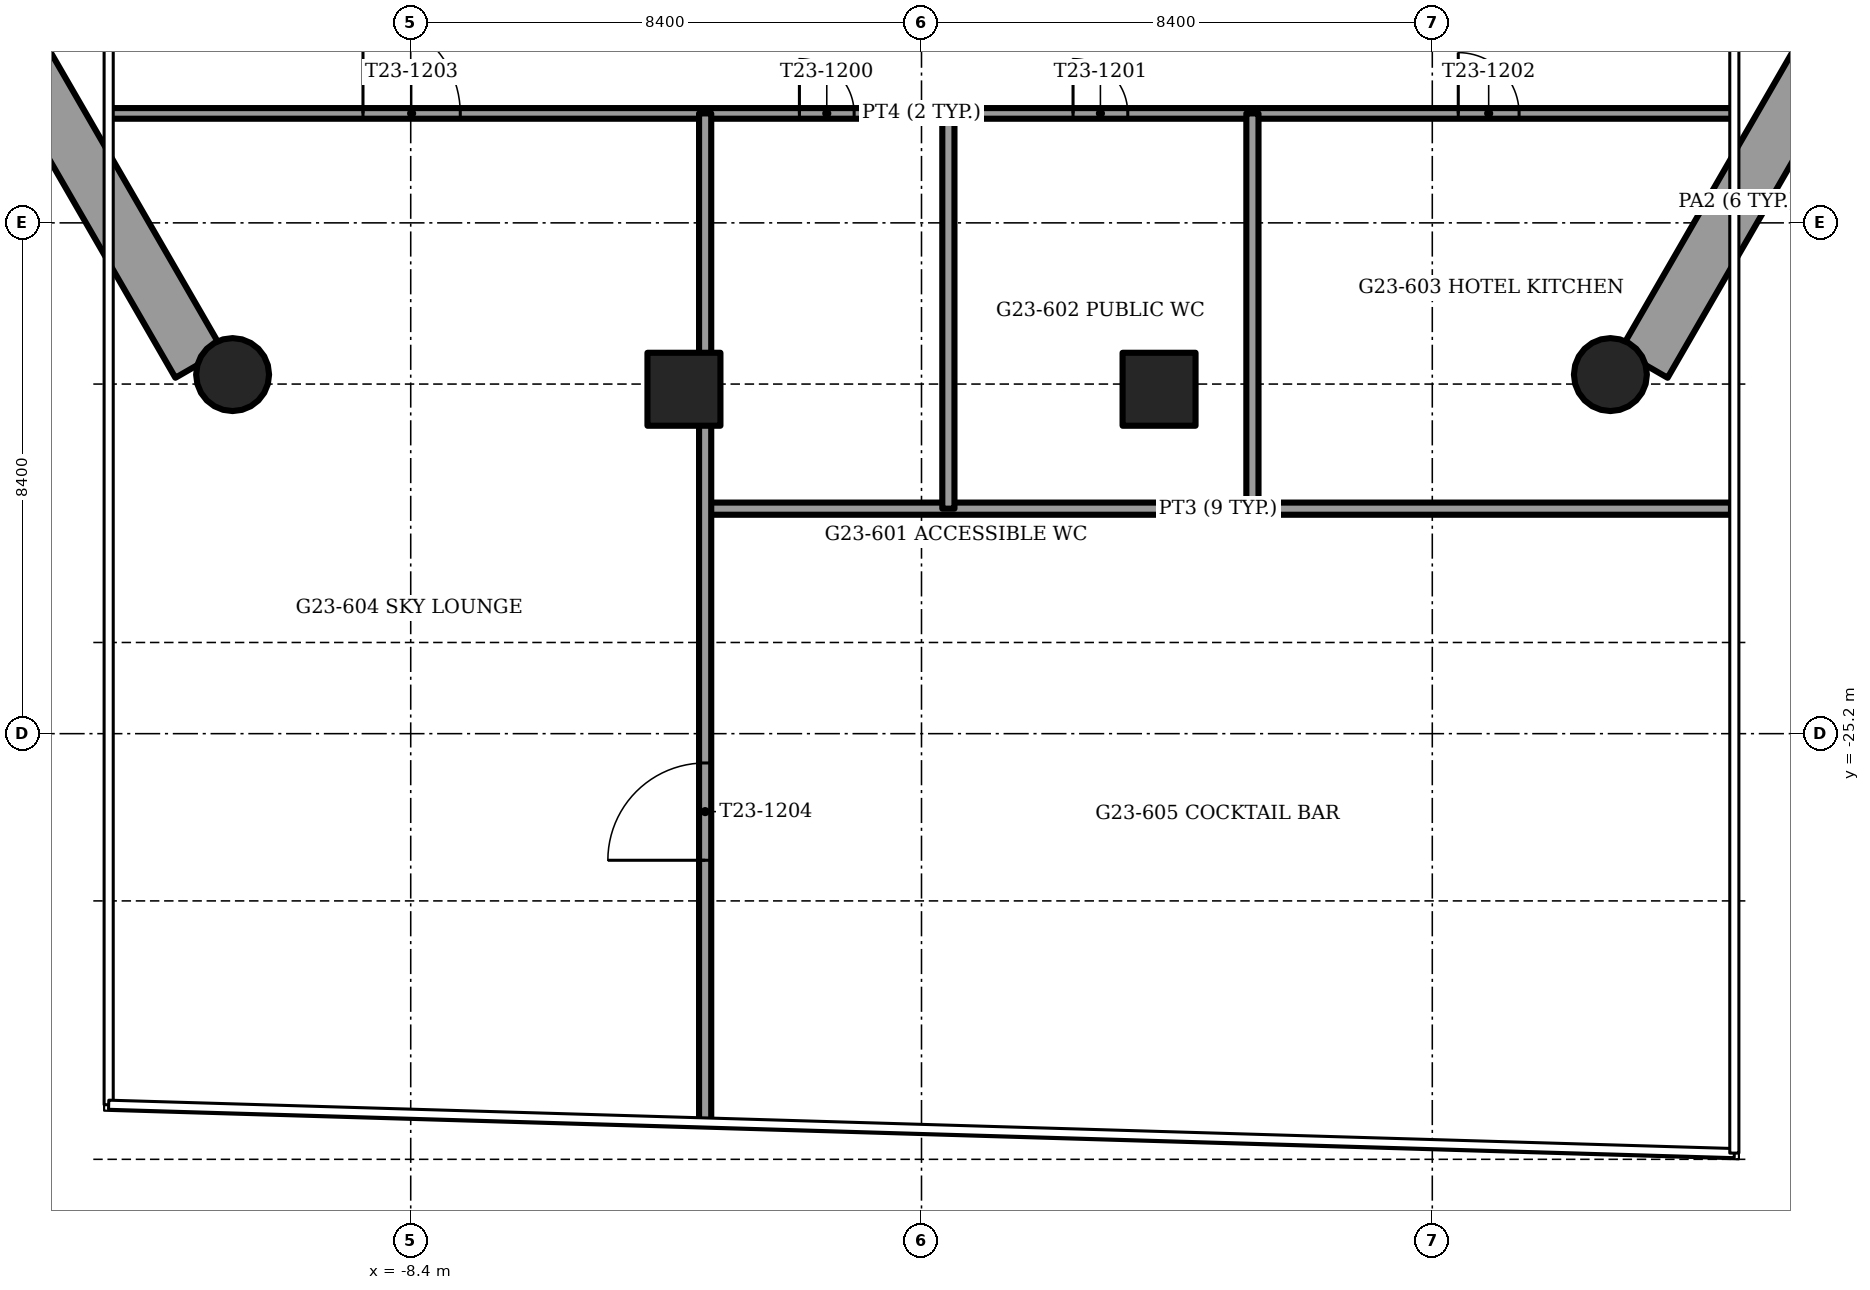
"""IFC4 building model, lengths in metres.
Left out: names, types, materials, properties, quantities, classifications, styles, units other than length and angle.
Written with IfcOpenShell. Run it as: python <this file> out.ifc"""

import sys

from ifc_helpers import new_model, si_unit, direction, frame, frame_2d, origin, origin_2d, place, context, subcontext, project, spatial, rectangle, circle, extrude, element, fill, save


model = new_model("IFC4")
c1 = context("Model", 3, precision=1e-05, world=origin(), true_north=direction((0.0, 1.0)))
c2 = subcontext(c1, "Body", "Model", "MODEL_VIEW")
j1 = project(units=[si_unit("LENGTHUNIT", "METRE"), si_unit("PLANEANGLEUNIT", "RADIAN")], contexts=[c1])
p1 = place(None, origin())
s1 = spatial("IfcSite", under=j1, at=p1, CompositionType="ELEMENT")
p2 = place(p1, origin())
s2 = spatial("IfcBuilding", under=s1, at=p2, CompositionType="ELEMENT")
p3 = place(p2, frame((0.0, 0.0, 93.0)))
s3 = spatial("IfcBuildingStorey", under=s2, at=p3, CompositionType="ELEMENT", Elevation=93.0)
for number, where, z_axis, x_axis in (
    (1, (-11.329, -19.295, -1.2), (0.0, 0.0, 1.0), (1.0, 0.0, 0.0)),
    (2, (11.329, -19.295, -1.2), (0.0, 0.0, 1.0), (1.0, 0.0, 0.0)),
):
    element("IfcColumn", number, at=place(p3, frame(where, z_axis=z_axis, x_axis=x_axis)), inside=s3, PredefinedType="COLUMN", context=c2, shape_type="SweptSolid", body=[
        extrude(circle(Radius=0.6, at=origin_2d()), origin(), (0.0, 0.0, 1.0), 3.75),
    ])
for number, where, z_axis, x_axis in (
    (3, (-15.107, -13.233, -1.2), (0.0, 0.0, 1.0), (-0.5, 0.866, 0.0)),
    (4, (-3.907, -19.536, -1.2), (0.0, 0.0, 1.0), (-1.0, 0.0, 0.0)),
    (5, (3.907, -19.536, -1.2), (0.0, 0.0, 1.0), (-1.0, 0.0, 0.0)),
    (6, (15.107, -13.233, -1.2), (0.0, 0.0, 1.0), (-0.5, -0.866, 0.0)),
):
    element("IfcColumn", number, at=place(p3, frame(where, z_axis=z_axis, x_axis=x_axis)), inside=s3, PredefinedType="COLUMN", context=c2, shape_type="SweptSolid", body=[
        extrude(rectangle(XDim=1.2, YDim=1.2, at=origin_2d()), origin(), (0.0, 0.0, 1.0), 3.75),
    ])
for number, where, z_axis, x_axis in (
    (7, (-14.952, -13.802, 0.0), (0.0, 0.0, 1.0), (0.5, -0.866, 0.0)),
    (8, (11.88, -19.123, 0.0), (0.0, 0.0, 1.0), (0.5, 0.866, 0.0)),
):
    element("IfcWall", number, at=place(p3, frame(where, z_axis=z_axis, x_axis=x_axis)), inside=s3, PredefinedType="PARAPET", context=c2, shape_type="SweptSolid", body=[
        extrude(rectangle(XDim=6.144, YDim=0.9, at=frame_2d((3.072, 0.0))), origin(), (0.0, 0.0, 1.0), 1.1),
    ])
p4 = place(p3, frame((-13.348, -15.0, 0.0), z_axis=(0.0, 0.0, 1.0), x_axis=(1.0, 0.0, 0.0)))
e9 = element("IfcWall", 9, at=p4, inside=s3, PredefinedType="PARTITIONING", context=c2, shape_type="SweptSolid", body=[
    extrude(rectangle(XDim=26.696, YDim=0.175, at=frame_2d((13.348, 0.0))), origin(), (0.0, 0.0, 1.0), 3.45),
])
p5 = place(p4, frame((11.34, 0.0, 0.0)))
e10 = element("IfcOpeningElement", 10, at=p5, cuts=e9, PredefinedType="OPENING", context=c2, shape_type="SweptSolid", body=[
    extrude(rectangle(XDim=0.9, YDim=2.1, at=frame_2d((0.45, 1.05))), frame((0.0, 0.087, 0.0), z_axis=(0.0, -1.0, 0.0), x_axis=(1.0, 0.0, 0.0)), (0.0, 0.0, 1.0), 0.175),
])
p6 = place(p4, frame((15.84, 0.0, 0.0)))
e11 = element("IfcOpeningElement", 11, at=p6, cuts=e9, PredefinedType="OPENING", context=c2, shape_type="SweptSolid", body=[
    extrude(rectangle(XDim=0.9, YDim=2.1, at=frame_2d((0.45, 1.05))), frame((0.0, 0.087, 0.0), z_axis=(0.0, -1.0, 0.0), x_axis=(1.0, 0.0, 0.0)), (0.0, 0.0, 1.0), 0.175),
])
p7 = place(p4, frame((22.175, 0.0, 0.0)))
e12 = element("IfcOpeningElement", 12, at=p7, cuts=e9, PredefinedType="OPENING", context=c2, shape_type="SweptSolid", body=[
    extrude(rectangle(XDim=1.0, YDim=2.1, at=frame_2d((0.5, 1.05))), frame((0.0, 0.087, 0.0), z_axis=(0.0, -1.0, 0.0), x_axis=(1.0, 0.0, 0.0)), (0.0, 0.0, 1.0), 0.175),
])
p8 = place(p4, frame((4.163, 0.0, 0.0)))
e13 = element("IfcOpeningElement", 13, at=p8, cuts=e9, PredefinedType="OPENING", context=c2, shape_type="SweptSolid", body=[
    extrude(rectangle(XDim=1.6, YDim=2.1, at=frame_2d((0.8, 1.05))), frame((0.0, 0.087, 0.0), z_axis=(0.0, -1.0, 0.0), x_axis=(1.0, 0.0, 0.0)), (0.0, 0.0, 1.0), 0.175),
])
p9 = place(p3, frame((-3.558, -21.5, 0.0), z_axis=(0.0, 0.0, 1.0), x_axis=(1.0, 0.0, 0.0)))
e14 = element("IfcWall", 14, at=p9, inside=s3, PredefinedType="PARTITIONING", context=c2, shape_type="SweptSolid", body=[
    extrude(rectangle(XDim=16.87, YDim=0.2, at=frame_2d((8.435, 0.0))), origin(), (0.0, 0.0, 1.0), 3.45),
])
p10 = place(p3, frame((-3.558, -31.575, 0.0), z_axis=(0.0, 0.0, 1.0), x_axis=(0.0, 1.0, 0.0)))
e15 = element("IfcWall", 15, at=p10, inside=s3, PredefinedType="PARTITIONING", context=c2, shape_type="SweptSolid", body=[
    extrude(rectangle(XDim=16.575, YDim=0.2, at=frame_2d((8.288, 0.0))), origin(), (0.0, 0.0, 1.0), 2.828),
])
p11 = place(p10, frame((4.293, 0.0, 0.0)))
e16 = element("IfcOpeningElement", 16, at=p11, cuts=e15, PredefinedType="OPENING", context=c2, shape_type="SweptSolid", body=[
    extrude(rectangle(XDim=1.6, YDim=2.1, at=frame_2d((0.8, 1.05))), frame((0.0, 0.1, 0.0), z_axis=(0.0, -1.0, 0.0), x_axis=(1.0, 0.0, 0.0)), (0.0, 0.0, 1.0), 0.2),
])
for number, where, z_axis, x_axis in (
    (17, (0.442, -21.5, 0.0), (0.0, 0.0, 1.0), (0.0, 1.0, 0.0)),
    (18, (5.442, -21.5, 0.0), (0.0, 0.0, 1.0), (0.0, 1.0, 0.0)),
):
    element("IfcWall", number, at=place(p3, frame(where, z_axis=z_axis, x_axis=x_axis)), inside=s3, PredefinedType="PARTITIONING", context=c2, shape_type="SweptSolid", body=[
        extrude(rectangle(XDim=6.5, YDim=0.2, at=frame_2d((3.25, 0.0))), origin(), (0.0, 0.0, 1.0), 2.828),
    ])
p12 = place(p5, origin())
e19 = element("IfcDoor", 19, at=p12, inside=s3, OperationType="SINGLE_SWING_RIGHT", PredefinedType="DOOR", context=c2, shape_type="SweptSolid", body=[
    extrude(rectangle(XDim=0.9, YDim=2.1, at=frame_2d((0.45, 1.05))), frame((0.0, 0.025, 0.0), z_axis=(0.0, -1.0, 0.0), x_axis=(1.0, 0.0, 0.0)), (0.0, 0.0, 1.0), 0.05),
])
fill(e10, e19)
p13 = place(p6, origin())
e20 = element("IfcDoor", 20, at=p13, inside=s3, OperationType="SINGLE_SWING_LEFT", PredefinedType="DOOR", context=c2, shape_type="SweptSolid", body=[
    extrude(rectangle(XDim=0.9, YDim=2.1, at=frame_2d((0.45, 1.05))), frame((0.0, 0.025, 0.0), z_axis=(0.0, -1.0, 0.0), x_axis=(1.0, 0.0, 0.0)), (0.0, 0.0, 1.0), 0.05),
])
fill(e11, e20)
p14 = place(p7, origin())
e21 = element("IfcDoor", 21, at=p14, inside=s3, OperationType="SINGLE_SWING_RIGHT", PredefinedType="DOOR", context=c2, shape_type="SweptSolid", body=[
    extrude(rectangle(XDim=1.0, YDim=2.1, at=frame_2d((0.5, 1.05))), frame((0.0, 0.025, 0.0), z_axis=(0.0, -1.0, 0.0), x_axis=(1.0, 0.0, 0.0)), (0.0, 0.0, 1.0), 0.05),
])
fill(e12, e21)
p15 = place(p8, origin())
e22 = element("IfcDoor", 22, at=p15, inside=s3, OperationType="DOUBLE_DOOR_SINGLE_SWING", PredefinedType="DOOR", context=c2, shape_type="SweptSolid", body=[
    extrude(rectangle(XDim=1.6, YDim=2.1, at=frame_2d((0.8, 1.05))), frame((0.0, 0.025, 0.0), z_axis=(0.0, -1.0, 0.0), x_axis=(1.0, 0.0, 0.0)), (0.0, 0.0, 1.0), 0.05),
])
fill(e13, e22)
p16 = place(p11, origin())
e23 = element("IfcDoor", 23, at=p16, inside=s3, OperationType="DOUBLE_DOOR_SINGLE_SWING", PredefinedType="DOOR", context=c2, shape_type="SweptSolid", body=[
    extrude(rectangle(XDim=1.6, YDim=2.1, at=frame_2d((0.8, 1.05))), frame((0.0, 0.025, 0.0), z_axis=(0.0, -1.0, 0.0), x_axis=(1.0, 0.0, 0.0)), (0.0, 0.0, 1.0), 0.05),
])
fill(e16, e23)
save(model, sys.argv[1])
